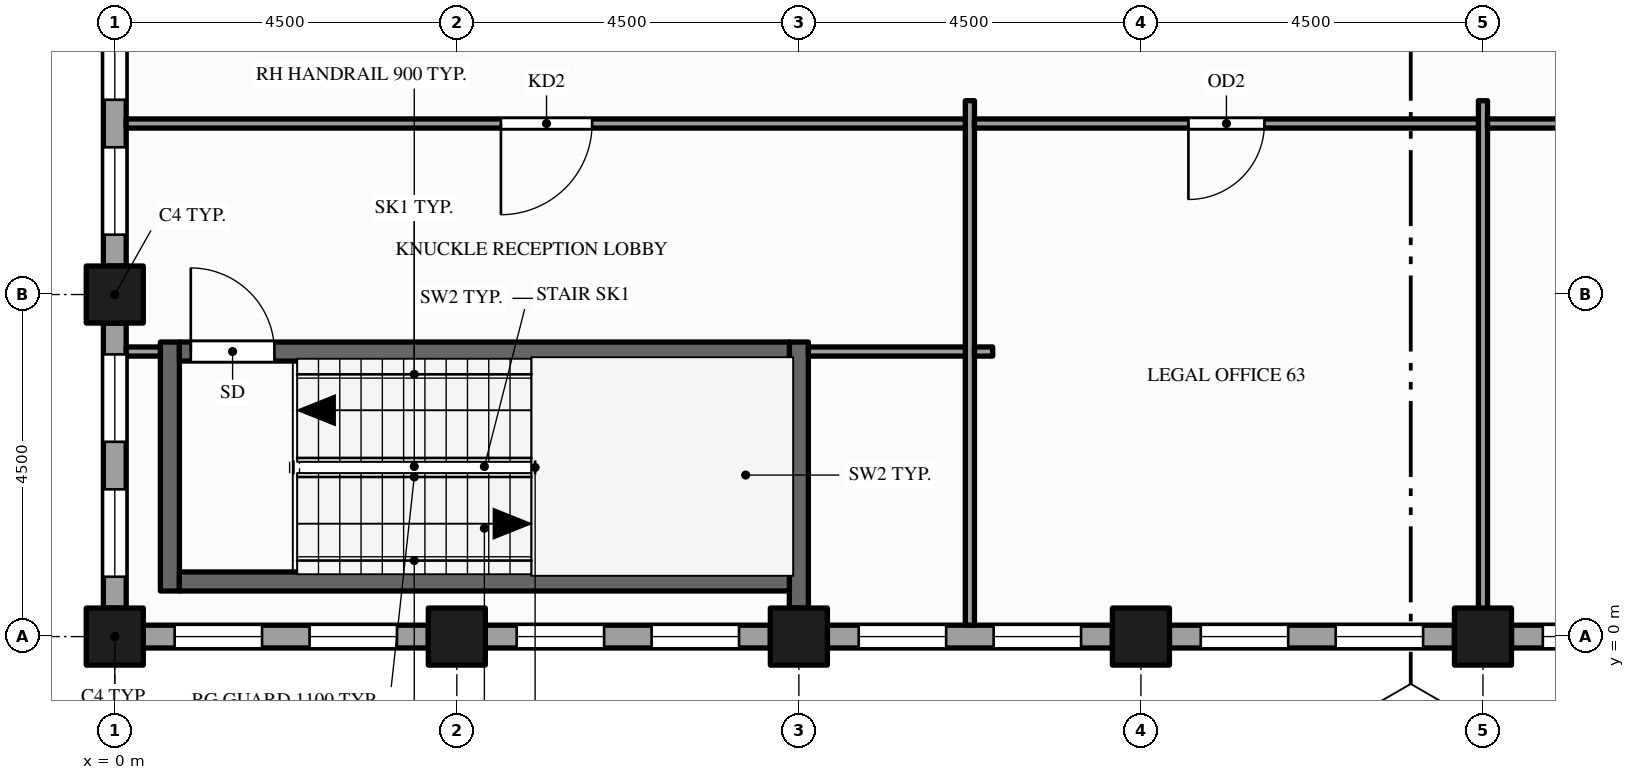
"""IFC4 building model, lengths in metres.
Left out: names, types, materials, properties, quantities, classifications, styles, units other than length and angle.
Written with IfcOpenShell. Run it as: python <this file> out.ifc"""

import sys

from ifc_helpers import new_model, si_unit, direction, frame, frame_2d, origin, origin_2d, place, context, subcontext, project, spatial, rectangle, hollow_rectangle, extrude, element, fill, save


model = new_model("IFC4")
c1 = context("Model", 3, precision=1e-05, world=origin(), true_north=direction((0.0, 1.0)))
c2 = subcontext(c1, "Body", "Model", "MODEL_VIEW")
j1 = project(units=[si_unit("LENGTHUNIT", "METRE"), si_unit("PLANEANGLEUNIT", "RADIAN")], contexts=[c1])
p1 = place(None, origin())
s1 = spatial("IfcSite", under=j1, at=p1, CompositionType="ELEMENT")
p2 = place(p1, origin())
s2 = spatial("IfcBuilding", under=s1, at=p2, CompositionType="ELEMENT")
p3 = place(p2, frame((0.0, 0.0, 215.0)))
s3 = spatial("IfcBuildingStorey", under=s2, at=p3, CompositionType="ELEMENT", Elevation=215.0)
for number, where, z_axis, x_axis in (
    (1, (0.0, 0.0, -0.15), (0.0, 0.0, 1.0), (1.0, 0.0, 0.0)),
    (2, (0.0, 4.5, -0.15), (0.0, 0.0, 1.0), (1.0, 0.0, 0.0)),
    (3, (4.5, 0.0, -0.15), (0.0, 0.0, 1.0), (1.0, 0.0, 0.0)),
    (4, (9.0, 0.0, -0.15), (0.0, 0.0, 1.0), (1.0, 0.0, 0.0)),
    (5, (13.5, 0.0, -0.15), (0.0, 0.0, 1.0), (1.0, 0.0, 0.0)),
    (6, (18.0, 0.0, -0.15), (0.0, 0.0, 1.0), (1.0, 0.0, 0.0)),
):
    element("IfcColumn", number, at=place(p3, frame(where, z_axis=z_axis, x_axis=x_axis)), inside=s3, PredefinedType="COLUMN", context=c2, shape_type="SweptSolid", body=[
        extrude(hollow_rectangle(XDim=0.75, YDim=0.75, WallThickness=0.036, at=origin_2d()), origin(), (0.0, 0.0, 1.0), 4.0),
    ])
p4 = place(p3, frame((0.0, 8.625, 0.0), z_axis=(0.0, 0.0, 1.0), x_axis=(0.0, -1.0, 0.0)))
e7 = element("IfcWall", 7, at=p4, inside=s3, PredefinedType="STANDARD", context=c2, shape_type="SweptSolid", body=[
    extrude(rectangle(XDim=3.75, YDim=0.3, at=frame_2d((1.875, 0.0))), origin(), (0.0, 0.0, 1.0), 3.157),
])
p5 = place(p4, frame((0.413, 0.0, 0.9)))
e8 = element("IfcOpeningElement", 8, at=p5, cuts=e7, PredefinedType="OPENING", context=c2, shape_type="SweptSolid", body=[
    extrude(rectangle(XDim=1.15, YDim=2.0, at=frame_2d((0.575, 1.0))), frame((0.0, 0.16, 0.0), z_axis=(0.0, -1.0, 0.0), x_axis=(1.0, 0.0, 0.0)), (0.0, 0.0, 1.0), 0.32),
])
p6 = place(p4, frame((2.188, 0.0, 0.9)))
e9 = element("IfcOpeningElement", 9, at=p6, cuts=e7, PredefinedType="OPENING", context=c2, shape_type="SweptSolid", body=[
    extrude(rectangle(XDim=1.15, YDim=2.0, at=frame_2d((0.575, 1.0))), frame((0.0, 0.16, 0.0), z_axis=(0.0, -1.0, 0.0), x_axis=(1.0, 0.0, 0.0)), (0.0, 0.0, 1.0), 0.32),
])
p7 = place(p3, frame((0.0, 4.125, 0.0), z_axis=(0.0, 0.0, 1.0), x_axis=(0.0, -1.0, 0.0)))
e10 = element("IfcWall", 10, at=p7, inside=s3, PredefinedType="STANDARD", context=c2, shape_type="SweptSolid", body=[
    extrude(rectangle(XDim=3.75, YDim=0.3, at=frame_2d((1.875, 0.0))), origin(), (0.0, 0.0, 1.0), 3.157),
])
p8 = place(p7, frame((0.413, 0.0, 0.9)))
e11 = element("IfcOpeningElement", 11, at=p8, cuts=e10, PredefinedType="OPENING", context=c2, shape_type="SweptSolid", body=[
    extrude(rectangle(XDim=1.15, YDim=2.0, at=frame_2d((0.575, 1.0))), frame((0.0, 0.16, 0.0), z_axis=(0.0, -1.0, 0.0), x_axis=(1.0, 0.0, 0.0)), (0.0, 0.0, 1.0), 0.32),
])
p9 = place(p7, frame((2.188, 0.0, 0.9)))
e12 = element("IfcOpeningElement", 12, at=p9, cuts=e10, PredefinedType="OPENING", context=c2, shape_type="SweptSolid", body=[
    extrude(rectangle(XDim=1.15, YDim=2.0, at=frame_2d((0.575, 1.0))), frame((0.0, 0.16, 0.0), z_axis=(0.0, -1.0, 0.0), x_axis=(1.0, 0.0, 0.0)), (0.0, 0.0, 1.0), 0.32),
])
p10 = place(p3, frame((0.375, 0.0, 0.0), z_axis=(0.0, 0.0, 1.0), x_axis=(1.0, 0.0, 0.0)))
e13 = element("IfcWall", 13, at=p10, inside=s3, PredefinedType="STANDARD", context=c2, shape_type="SweptSolid", body=[
    extrude(rectangle(XDim=3.75, YDim=0.3, at=frame_2d((1.875, 0.0))), origin(), (0.0, 0.0, 1.0), 3.157),
])
p11 = place(p10, frame((0.413, 0.0, 0.9)))
e14 = element("IfcOpeningElement", 14, at=p11, cuts=e13, PredefinedType="OPENING", context=c2, shape_type="SweptSolid", body=[
    extrude(rectangle(XDim=1.15, YDim=2.0, at=frame_2d((0.575, 1.0))), frame((0.0, 0.16, 0.0), z_axis=(0.0, -1.0, 0.0), x_axis=(1.0, 0.0, 0.0)), (0.0, 0.0, 1.0), 0.32),
])
p12 = place(p10, frame((2.188, 0.0, 0.9)))
e15 = element("IfcOpeningElement", 15, at=p12, cuts=e13, PredefinedType="OPENING", context=c2, shape_type="SweptSolid", body=[
    extrude(rectangle(XDim=1.15, YDim=2.0, at=frame_2d((0.575, 1.0))), frame((0.0, 0.16, 0.0), z_axis=(0.0, -1.0, 0.0), x_axis=(1.0, 0.0, 0.0)), (0.0, 0.0, 1.0), 0.32),
])
p13 = place(p3, frame((4.875, 0.0, 0.0), z_axis=(0.0, 0.0, 1.0), x_axis=(1.0, 0.0, 0.0)))
e16 = element("IfcWall", 16, at=p13, inside=s3, PredefinedType="STANDARD", context=c2, shape_type="SweptSolid", body=[
    extrude(rectangle(XDim=3.75, YDim=0.3, at=frame_2d((1.875, 0.0))), origin(), (0.0, 0.0, 1.0), 3.157),
])
p14 = place(p13, frame((0.413, 0.0, 0.9)))
e17 = element("IfcOpeningElement", 17, at=p14, cuts=e16, PredefinedType="OPENING", context=c2, shape_type="SweptSolid", body=[
    extrude(rectangle(XDim=1.15, YDim=2.0, at=frame_2d((0.575, 1.0))), frame((0.0, 0.16, 0.0), z_axis=(0.0, -1.0, 0.0), x_axis=(1.0, 0.0, 0.0)), (0.0, 0.0, 1.0), 0.32),
])
p15 = place(p13, frame((2.188, 0.0, 0.9)))
e18 = element("IfcOpeningElement", 18, at=p15, cuts=e16, PredefinedType="OPENING", context=c2, shape_type="SweptSolid", body=[
    extrude(rectangle(XDim=1.15, YDim=2.0, at=frame_2d((0.575, 1.0))), frame((0.0, 0.16, 0.0), z_axis=(0.0, -1.0, 0.0), x_axis=(1.0, 0.0, 0.0)), (0.0, 0.0, 1.0), 0.32),
])
p16 = place(p3, frame((9.375, 0.0, 0.0), z_axis=(0.0, 0.0, 1.0), x_axis=(1.0, 0.0, 0.0)))
e19 = element("IfcWall", 19, at=p16, inside=s3, PredefinedType="STANDARD", context=c2, shape_type="SweptSolid", body=[
    extrude(rectangle(XDim=3.75, YDim=0.3, at=frame_2d((1.875, 0.0))), origin(), (0.0, 0.0, 1.0), 2.87),
])
p17 = place(p16, frame((0.413, 0.0, 0.9)))
e20 = element("IfcOpeningElement", 20, at=p17, cuts=e19, PredefinedType="OPENING", context=c2, shape_type="SweptSolid", body=[
    extrude(rectangle(XDim=1.15, YDim=1.75, at=frame_2d((0.575, 0.875))), frame((0.0, 0.16, 0.0), z_axis=(0.0, -1.0, 0.0), x_axis=(1.0, 0.0, 0.0)), (0.0, 0.0, 1.0), 0.32),
])
p18 = place(p16, frame((2.188, 0.0, 0.9)))
e21 = element("IfcOpeningElement", 21, at=p18, cuts=e19, PredefinedType="OPENING", context=c2, shape_type="SweptSolid", body=[
    extrude(rectangle(XDim=1.15, YDim=1.75, at=frame_2d((0.575, 0.875))), frame((0.0, 0.16, 0.0), z_axis=(0.0, -1.0, 0.0), x_axis=(1.0, 0.0, 0.0)), (0.0, 0.0, 1.0), 0.32),
])
p19 = place(p3, frame((13.875, 0.0, 0.0), z_axis=(0.0, 0.0, 1.0), x_axis=(1.0, 0.0, 0.0)))
e22 = element("IfcWall", 22, at=p19, inside=s3, PredefinedType="STANDARD", context=c2, shape_type="SweptSolid", body=[
    extrude(rectangle(XDim=3.75, YDim=0.3, at=frame_2d((1.875, 0.0))), origin(), (0.0, 0.0, 1.0), 2.87),
])
p20 = place(p19, frame((0.413, 0.0, 0.9)))
e23 = element("IfcOpeningElement", 23, at=p20, cuts=e22, PredefinedType="OPENING", context=c2, shape_type="SweptSolid", body=[
    extrude(rectangle(XDim=1.15, YDim=1.75, at=frame_2d((0.575, 0.875))), frame((0.0, 0.16, 0.0), z_axis=(0.0, -1.0, 0.0), x_axis=(1.0, 0.0, 0.0)), (0.0, 0.0, 1.0), 0.32),
])
p21 = place(p19, frame((2.188, 0.0, 0.9)))
e24 = element("IfcOpeningElement", 24, at=p21, cuts=e22, PredefinedType="OPENING", context=c2, shape_type="SweptSolid", body=[
    extrude(rectangle(XDim=1.15, YDim=1.75, at=frame_2d((0.575, 0.875))), frame((0.0, 0.16, 0.0), z_axis=(0.0, -1.0, 0.0), x_axis=(1.0, 0.0, 0.0)), (0.0, 0.0, 1.0), 0.32),
])
p22 = place(p3, frame((18.375, 0.0, 0.0), z_axis=(0.0, 0.0, 1.0), x_axis=(1.0, 0.0, 0.0)))
e25 = element("IfcWall", 25, at=p22, inside=s3, PredefinedType="STANDARD", context=c2, shape_type="SweptSolid", body=[
    extrude(rectangle(XDim=3.75, YDim=0.3, at=frame_2d((1.875, 0.0))), origin(), (0.0, 0.0, 1.0), 2.87),
])
p23 = place(p22, frame((0.413, 0.0, 0.9)))
e26 = element("IfcOpeningElement", 26, at=p23, cuts=e25, PredefinedType="OPENING", context=c2, shape_type="SweptSolid", body=[
    extrude(rectangle(XDim=1.15, YDim=1.75, at=frame_2d((0.575, 0.875))), frame((0.0, 0.16, 0.0), z_axis=(0.0, -1.0, 0.0), x_axis=(1.0, 0.0, 0.0)), (0.0, 0.0, 1.0), 0.32),
])
p24 = place(p22, frame((2.188, 0.0, 0.9)))
e27 = element("IfcOpeningElement", 27, at=p24, cuts=e25, PredefinedType="OPENING", context=c2, shape_type="SweptSolid", body=[
    extrude(rectangle(XDim=1.15, YDim=1.75, at=frame_2d((0.575, 0.875))), frame((0.0, 0.16, 0.0), z_axis=(0.0, -1.0, 0.0), x_axis=(1.0, 0.0, 0.0)), (0.0, 0.0, 1.0), 0.32),
])
p25 = place(p3, frame((0.725, 0.6, 0.0), z_axis=(0.0, 0.0, 1.0), x_axis=(0.0, 1.0, 0.0)))
e28 = element("IfcWall", 28, at=p25, inside=s3, PredefinedType="SHEAR", context=c2, shape_type="SweptSolid", body=[
    extrude(rectangle(XDim=3.275, YDim=0.25, at=frame_2d((1.637, 0.0))), origin(), (0.0, 0.0, 1.0), 3.85),
])
p26 = place(p3, frame((9.0, 0.375, 0.0), z_axis=(0.0, 0.0, 1.0), x_axis=(0.0, 1.0, 0.0)))
e29 = element("IfcWall", 29, at=p26, inside=s3, PredefinedType="SHEAR", context=c2, shape_type="SweptSolid", body=[
    extrude(rectangle(XDim=3.5, YDim=0.25, at=frame_2d((1.75, 0.0))), origin(), (0.0, 0.0, 1.0), 3.85),
])
for number, where, z_axis, x_axis in (
    (30, (11.25, 0.15, 0.0), (0.0, 0.0, 1.0), (0.0, 1.0, 0.0)),
    (31, (18.0, 0.15, 0.0), (0.0, 0.0, 1.0), (0.0, 1.0, 0.0)),
):
    element("IfcWall", number, at=place(p3, frame(where, z_axis=z_axis, x_axis=x_axis)), inside=s3, PredefinedType="PARTITIONING", context=c2, shape_type="SweptSolid", body=[
        extrude(rectangle(XDim=6.9, YDim=0.12, at=frame_2d((3.45, 0.0))), origin(), (0.0, 0.0, 1.0), 2.87),
    ])
p27 = place(p3, frame((0.85, 0.725, 0.0), z_axis=(0.0, 0.0, 1.0), x_axis=(1.0, 0.0, 0.0)))
e32 = element("IfcWall", 32, at=p27, inside=s3, PredefinedType="SHEAR", context=c2, shape_type="SweptSolid", body=[
    extrude(rectangle(XDim=8.025, YDim=0.25, at=frame_2d((4.012, 0.0))), origin(), (0.0, 0.0, 1.0), 3.85),
])
p28 = place(p3, frame((0.15, 3.75, 0.0), z_axis=(0.0, 0.0, 1.0), x_axis=(1.0, 0.0, 0.0)))
e33 = element("IfcWall", 33, at=p28, inside=s3, PredefinedType="PARTITIONING", context=c2, shape_type="SweptSolid", body=[
    extrude(rectangle(XDim=0.45, YDim=0.12, at=frame_2d((0.225, 0.0))), origin(), (0.0, 0.0, 1.0), 3.85),
])
p29 = place(p3, frame((0.85, 3.75, 0.0), z_axis=(0.0, 0.0, 1.0), x_axis=(1.0, 0.0, 0.0)))
e34 = element("IfcWall", 34, at=p29, inside=s3, PredefinedType="SHEAR", context=c2, shape_type="SweptSolid", body=[
    extrude(rectangle(XDim=8.025, YDim=0.25, at=frame_2d((4.012, 0.0))), origin(), (0.0, 0.0, 1.0), 3.85),
])
p30 = place(p29, frame((0.15, 0.0, 0.0)))
e35 = element("IfcOpeningElement", 35, at=p30, cuts=e34, PredefinedType="OPENING", context=c2, shape_type="SweptSolid", body=[
    extrude(rectangle(XDim=1.1, YDim=2.1, at=frame_2d((0.55, 1.05))), frame((0.0, 0.135, 0.0), z_axis=(0.0, -1.0, 0.0), x_axis=(1.0, 0.0, 0.0)), (0.0, 0.0, 1.0), 0.27),
])
p31 = place(p3, frame((9.125, 3.75, 0.0), z_axis=(0.0, 0.0, 1.0), x_axis=(1.0, 0.0, 0.0)))
e36 = element("IfcWall", 36, at=p31, inside=s3, PredefinedType="PARTITIONING", context=c2, shape_type="SweptSolid", body=[
    extrude(rectangle(XDim=2.065, YDim=0.12, at=frame_2d((1.032, 0.0))), origin(), (0.0, 0.0, 1.0), 2.87),
])
p32 = place(p3, frame((11.31, 3.75, 0.0), z_axis=(0.0, 0.0, 1.0), x_axis=(1.0, 0.0, 0.0)))
e37 = element("IfcWall", 37, at=p32, inside=s3, PredefinedType="PARTITIONING", context=c2, shape_type="SweptSolid", body=[
    extrude(rectangle(XDim=0.24, YDim=0.12, at=frame_2d((0.12, 0.0))), origin(), (0.0, 0.0, 1.0), 2.87),
])
p33 = place(p3, frame((0.15, 6.75, 0.0), z_axis=(0.0, 0.0, 1.0), x_axis=(1.0, 0.0, 0.0)))
e38 = element("IfcWall", 38, at=p33, inside=s3, PredefinedType="PARTITIONING", context=c2, shape_type="SweptSolid", body=[
    extrude(rectangle(XDim=11.04, YDim=0.12, at=frame_2d((5.52, 0.0))), origin(), (0.0, 0.0, 1.0), 2.87),
])
p34 = place(p33, frame((4.93, 0.0, 0.0)))
e39 = element("IfcOpeningElement", 39, at=p34, cuts=e38, PredefinedType="OPENING", context=c2, shape_type="SweptSolid", body=[
    extrude(rectangle(XDim=1.2, YDim=2.1, at=frame_2d((0.6, 1.05))), frame((0.0, 0.07, 0.0), z_axis=(0.0, -1.0, 0.0), x_axis=(1.0, 0.0, 0.0)), (0.0, 0.0, 1.0), 0.14),
])
p35 = place(p3, frame((11.31, 6.75, 0.0), z_axis=(0.0, 0.0, 1.0), x_axis=(1.0, 0.0, 0.0)))
e40 = element("IfcWall", 40, at=p35, inside=s3, PredefinedType="PARTITIONING", context=c2, shape_type="SweptSolid", body=[
    extrude(rectangle(XDim=6.63, YDim=0.12, at=frame_2d((3.315, 0.0))), origin(), (0.0, 0.0, 1.0), 2.87),
])
p36 = place(p35, frame((2.815, 0.0, 0.0)))
e41 = element("IfcOpeningElement", 41, at=p36, cuts=e40, PredefinedType="OPENING", context=c2, shape_type="SweptSolid", body=[
    extrude(rectangle(XDim=1.0, YDim=2.1, at=frame_2d((0.5, 1.05))), frame((0.0, 0.07, 0.0), z_axis=(0.0, -1.0, 0.0), x_axis=(1.0, 0.0, 0.0)), (0.0, 0.0, 1.0), 0.14),
])
p37 = place(p3, frame((18.06, 6.75, 0.0), z_axis=(0.0, 0.0, 1.0), x_axis=(1.0, 0.0, 0.0)))
e42 = element("IfcWall", 42, at=p37, inside=s3, PredefinedType="PARTITIONING", context=c2, shape_type="SweptSolid", body=[
    extrude(rectangle(XDim=6.63, YDim=0.12, at=frame_2d((3.315, 0.0))), origin(), (0.0, 0.0, 1.0), 2.76),
])
p38 = place(p37, frame((2.865, 0.0, 0.0)))
e43 = element("IfcOpeningElement", 43, at=p38, cuts=e42, PredefinedType="OPENING", context=c2, shape_type="SweptSolid", body=[
    extrude(rectangle(XDim=0.9, YDim=2.1, at=frame_2d((0.45, 1.05))), frame((0.0, 0.07, 0.0), z_axis=(0.0, -1.0, 0.0), x_axis=(1.0, 0.0, 0.0)), (0.0, 0.0, 1.0), 0.14),
])
p39 = place(p5, origin())
e44 = element("IfcWindow", 44, at=p39, inside=s3, PartitioningType="SINGLE_PANEL", PredefinedType="WINDOW", context=c2, shape_type="SweptSolid", body=[
    extrude(rectangle(XDim=1.15, YDim=2.0, at=frame_2d((0.575, 1.0))), frame((0.0, 0.03, 0.0), z_axis=(0.0, -1.0, 0.0), x_axis=(1.0, 0.0, 0.0)), (0.0, 0.0, 1.0), 0.06),
])
fill(e8, e44)
p40 = place(p6, origin())
e45 = element("IfcWindow", 45, at=p40, inside=s3, PartitioningType="SINGLE_PANEL", PredefinedType="WINDOW", context=c2, shape_type="SweptSolid", body=[
    extrude(rectangle(XDim=1.15, YDim=2.0, at=frame_2d((0.575, 1.0))), frame((0.0, 0.03, 0.0), z_axis=(0.0, -1.0, 0.0), x_axis=(1.0, 0.0, 0.0)), (0.0, 0.0, 1.0), 0.06),
])
fill(e9, e45)
p41 = place(p8, origin())
e46 = element("IfcWindow", 46, at=p41, inside=s3, PartitioningType="SINGLE_PANEL", PredefinedType="WINDOW", context=c2, shape_type="SweptSolid", body=[
    extrude(rectangle(XDim=1.15, YDim=2.0, at=frame_2d((0.575, 1.0))), frame((0.0, 0.03, 0.0), z_axis=(0.0, -1.0, 0.0), x_axis=(1.0, 0.0, 0.0)), (0.0, 0.0, 1.0), 0.06),
])
fill(e11, e46)
p42 = place(p9, origin())
e47 = element("IfcWindow", 47, at=p42, inside=s3, PartitioningType="SINGLE_PANEL", PredefinedType="WINDOW", context=c2, shape_type="SweptSolid", body=[
    extrude(rectangle(XDim=1.15, YDim=2.0, at=frame_2d((0.575, 1.0))), frame((0.0, 0.03, 0.0), z_axis=(0.0, -1.0, 0.0), x_axis=(1.0, 0.0, 0.0)), (0.0, 0.0, 1.0), 0.06),
])
fill(e12, e47)
p43 = place(p11, origin())
e48 = element("IfcWindow", 48, at=p43, inside=s3, PartitioningType="SINGLE_PANEL", PredefinedType="WINDOW", context=c2, shape_type="SweptSolid", body=[
    extrude(rectangle(XDim=1.15, YDim=2.0, at=frame_2d((0.575, 1.0))), frame((0.0, 0.03, 0.0), z_axis=(0.0, -1.0, 0.0), x_axis=(1.0, 0.0, 0.0)), (0.0, 0.0, 1.0), 0.06),
])
fill(e14, e48)
p44 = place(p12, origin())
e49 = element("IfcWindow", 49, at=p44, inside=s3, PartitioningType="SINGLE_PANEL", PredefinedType="WINDOW", context=c2, shape_type="SweptSolid", body=[
    extrude(rectangle(XDim=1.15, YDim=2.0, at=frame_2d((0.575, 1.0))), frame((0.0, 0.03, 0.0), z_axis=(0.0, -1.0, 0.0), x_axis=(1.0, 0.0, 0.0)), (0.0, 0.0, 1.0), 0.06),
])
fill(e15, e49)
p45 = place(p14, origin())
e50 = element("IfcWindow", 50, at=p45, inside=s3, PartitioningType="SINGLE_PANEL", PredefinedType="WINDOW", context=c2, shape_type="SweptSolid", body=[
    extrude(rectangle(XDim=1.15, YDim=2.0, at=frame_2d((0.575, 1.0))), frame((0.0, 0.03, 0.0), z_axis=(0.0, -1.0, 0.0), x_axis=(1.0, 0.0, 0.0)), (0.0, 0.0, 1.0), 0.06),
])
fill(e17, e50)
p46 = place(p15, origin())
e51 = element("IfcWindow", 51, at=p46, inside=s3, PartitioningType="SINGLE_PANEL", PredefinedType="WINDOW", context=c2, shape_type="SweptSolid", body=[
    extrude(rectangle(XDim=1.15, YDim=2.0, at=frame_2d((0.575, 1.0))), frame((0.0, 0.03, 0.0), z_axis=(0.0, -1.0, 0.0), x_axis=(1.0, 0.0, 0.0)), (0.0, 0.0, 1.0), 0.06),
])
fill(e18, e51)
p47 = place(p17, origin())
e52 = element("IfcWindow", 52, at=p47, inside=s3, PartitioningType="SINGLE_PANEL", PredefinedType="WINDOW", context=c2, shape_type="SweptSolid", body=[
    extrude(rectangle(XDim=1.15, YDim=1.75, at=frame_2d((0.575, 0.875))), frame((0.0, 0.03, 0.0), z_axis=(0.0, -1.0, 0.0), x_axis=(1.0, 0.0, 0.0)), (0.0, 0.0, 1.0), 0.06),
])
fill(e20, e52)
p48 = place(p18, origin())
e53 = element("IfcWindow", 53, at=p48, inside=s3, PartitioningType="SINGLE_PANEL", PredefinedType="WINDOW", context=c2, shape_type="SweptSolid", body=[
    extrude(rectangle(XDim=1.15, YDim=1.75, at=frame_2d((0.575, 0.875))), frame((0.0, 0.03, 0.0), z_axis=(0.0, -1.0, 0.0), x_axis=(1.0, 0.0, 0.0)), (0.0, 0.0, 1.0), 0.06),
])
fill(e21, e53)
p49 = place(p20, origin())
e54 = element("IfcWindow", 54, at=p49, inside=s3, PartitioningType="SINGLE_PANEL", PredefinedType="WINDOW", context=c2, shape_type="SweptSolid", body=[
    extrude(rectangle(XDim=1.15, YDim=1.75, at=frame_2d((0.575, 0.875))), frame((0.0, 0.03, 0.0), z_axis=(0.0, -1.0, 0.0), x_axis=(1.0, 0.0, 0.0)), (0.0, 0.0, 1.0), 0.06),
])
fill(e23, e54)
p50 = place(p21, origin())
e55 = element("IfcWindow", 55, at=p50, inside=s3, PartitioningType="SINGLE_PANEL", PredefinedType="WINDOW", context=c2, shape_type="SweptSolid", body=[
    extrude(rectangle(XDim=1.15, YDim=1.75, at=frame_2d((0.575, 0.875))), frame((0.0, 0.03, 0.0), z_axis=(0.0, -1.0, 0.0), x_axis=(1.0, 0.0, 0.0)), (0.0, 0.0, 1.0), 0.06),
])
fill(e24, e55)
p51 = place(p23, origin())
e56 = element("IfcWindow", 56, at=p51, inside=s3, PartitioningType="SINGLE_PANEL", PredefinedType="WINDOW", context=c2, shape_type="SweptSolid", body=[
    extrude(rectangle(XDim=1.15, YDim=1.75, at=frame_2d((0.575, 0.875))), frame((0.0, 0.03, 0.0), z_axis=(0.0, -1.0, 0.0), x_axis=(1.0, 0.0, 0.0)), (0.0, 0.0, 1.0), 0.06),
])
fill(e26, e56)
p52 = place(p30, origin())
e57 = element("IfcDoor", 57, at=p52, inside=s3, OperationType="SINGLE_SWING_LEFT", PredefinedType="DOOR", context=c2, shape_type="SweptSolid", body=[
    extrude(rectangle(XDim=1.1, YDim=2.1, at=frame_2d((0.55, 1.05))), frame((0.0, 0.025, 0.0), z_axis=(0.0, -1.0, 0.0), x_axis=(1.0, 0.0, 0.0)), (0.0, 0.0, 1.0), 0.05),
])
fill(e35, e57)
p53 = place(p34, origin())
e58 = element("IfcDoor", 58, at=p53, inside=s3, OperationType="SINGLE_SWING_LEFT", PredefinedType="DOOR", context=c2, shape_type="SweptSolid", body=[
    extrude(rectangle(XDim=1.2, YDim=2.1, at=frame_2d((0.6, 1.05))), frame((0.0, 0.025, 0.0), z_axis=(0.0, -1.0, 0.0), x_axis=(1.0, 0.0, 0.0)), (0.0, 0.0, 1.0), 0.05),
])
fill(e39, e58)
p54 = place(p36, origin())
e59 = element("IfcDoor", 59, at=p54, inside=s3, OperationType="SINGLE_SWING_LEFT", PredefinedType="DOOR", context=c2, shape_type="SweptSolid", body=[
    extrude(rectangle(XDim=1.0, YDim=2.1, at=frame_2d((0.5, 1.05))), frame((0.0, 0.025, 0.0), z_axis=(0.0, -1.0, 0.0), x_axis=(1.0, 0.0, 0.0)), (0.0, 0.0, 1.0), 0.05),
])
fill(e41, e59)
save(model, sys.argv[1])
